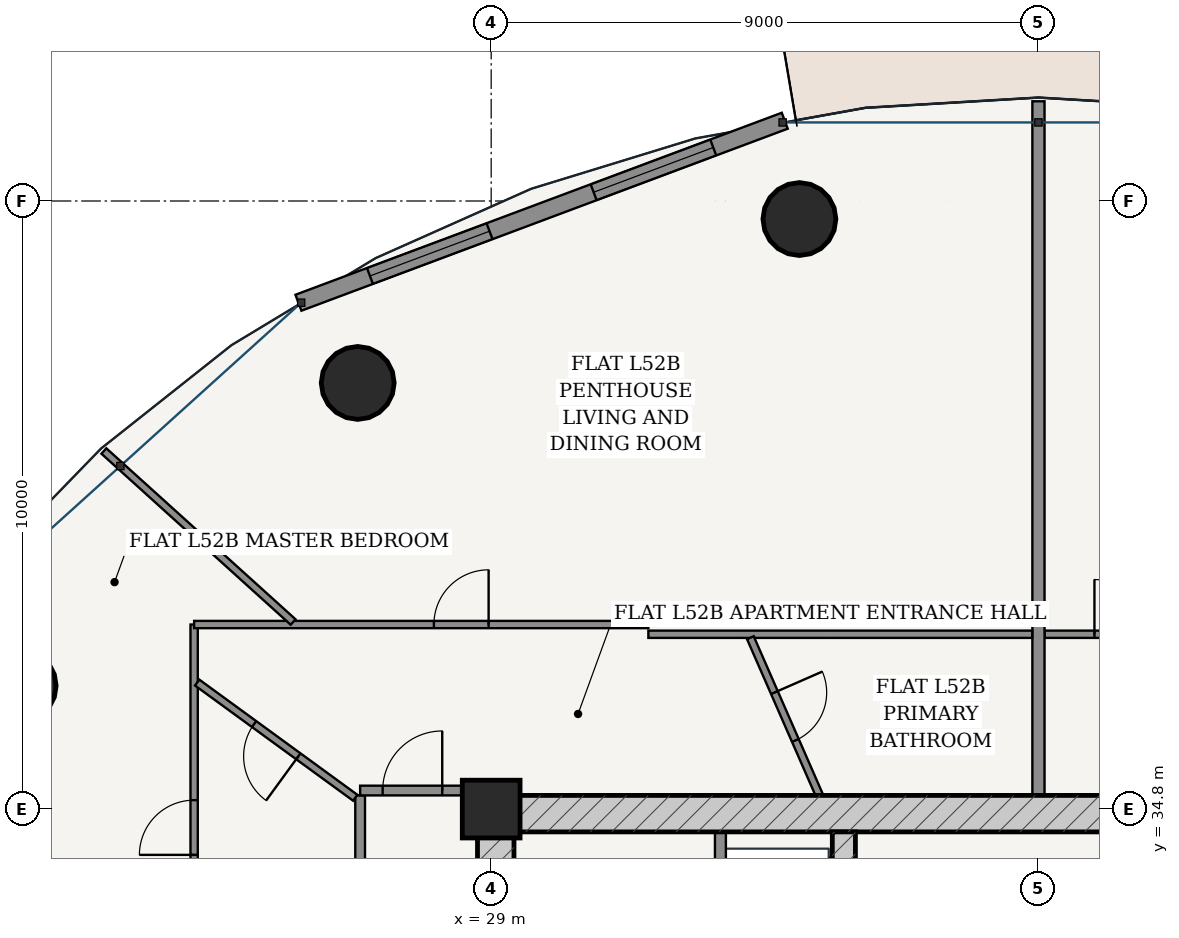
"""IFC4 building model, lengths in metres.
Left out: names, types, materials, properties, quantities, classifications, styles, units other than length and angle.
Written with IfcOpenShell. Run it as: python <this file> out.ifc"""

import sys

from ifc_helpers import new_model, si_unit, direction, frame, frame_2d, origin, origin_2d, place, context, subcontext, project, spatial, rectangle, hollow_circle, extrude, source, transform, mapped, element, fill, save


model = new_model("IFC4")
c1 = context("Model", 3, precision=1e-05, world=origin(), true_north=direction((-0.2419218956, 0.970295726276)))
c2 = subcontext(c1, "Body", "Model", "MODEL_VIEW")
j1 = project(units=[si_unit("LENGTHUNIT", "METRE"), si_unit("PLANEANGLEUNIT", "RADIAN")], contexts=[c1])
p1 = place(None, origin())
s1 = spatial("IfcSite", under=j1, at=p1, CompositionType="ELEMENT")
p2 = place(p1, origin())
s2 = spatial("IfcBuilding", under=s1, at=p2, CompositionType="ELEMENT")
p3 = place(p2, frame((0.0, 0.0, 198.6)))
s3 = spatial("IfcBuildingStorey", under=s2, at=p3, CompositionType="ELEMENT", Elevation=198.6)
p4 = place(p3, frame((29.0, 34.8, 0.0), z_axis=(0.0, 0.0, 1.0), x_axis=(1.0, 0.0, 0.0)))
e1 = element("IfcColumn", 1, at=p4, inside=s3, PredefinedType="COLUMN", context=c2, shape_type="SweptSolid", body=[
    extrude(rectangle(XDim=0.95, YDim=0.95, at=origin_2d()), origin(), (0.0, 0.0, 1.0), 3.7),
])
p5 = place(p3, frame((28.775, 34.725, 0.0), z_axis=(0.0, 0.0, 1.0), x_axis=(1.0, 0.0, 0.0)))
e2 = element("IfcWall", 2, at=p5, inside=s3, PredefinedType="SHEAR", context=c2, shape_type="SweptSolid", body=[
    extrude(rectangle(XDim=18.45, YDim=0.6, at=frame_2d((9.225, 0.0))), origin(), (0.0, 0.0, 1.0), 3.435),
])
p6 = place(p3, frame((29.075, 19.175, 0.0), z_axis=(0.0, 0.0, 1.0), x_axis=(0.0, 1.0, 0.0)))
e3 = element("IfcWall", 3, at=p6, inside=s3, PredefinedType="SHEAR", context=c2, shape_type="SweptSolid", body=[
    extrude(rectangle(XDim=15.25, YDim=0.6, at=frame_2d((7.625, 0.0))), origin(), (0.0, 0.0, 1.0), 3.435),
])
p7 = place(p6, frame((9.875, 0.0, 0.0)))
e4 = element("IfcOpeningElement", 4, at=p7, cuts=e3, PredefinedType="OPENING", context=c2, shape_type="SweptSolid", body=[
    extrude(rectangle(XDim=1.5, YDim=2.2, at=frame_2d((0.75, 1.1))), frame((0.0, 0.31, 0.0), z_axis=(0.0, -1.0, 0.0), x_axis=(1.0, 0.0, 0.0)), (0.0, 0.0, 1.0), 0.62),
])
p8 = place(p3, frame((34.8, 19.175, 0.0), z_axis=(0.0, 0.0, 1.0), x_axis=(0.0, 1.0, 0.0)))
e5 = element("IfcWall", 5, at=p8, inside=s3, PredefinedType="SHEAR", context=c2, shape_type="SweptSolid", body=[
    extrude(rectangle(XDim=15.25, YDim=0.38, at=frame_2d((7.625, 0.0))), origin(), (0.0, 0.0, 1.0), 3.435),
])
p9 = place(p8, frame((7.8, 0.0, 0.0)))
e6 = element("IfcOpeningElement", 6, at=p9, cuts=e5, PredefinedType="OPENING", context=c2, shape_type="SweptSolid", body=[
    extrude(rectangle(XDim=1.05, YDim=2.15, at=frame_2d((0.525, 1.075))), frame((0.0, 0.2, 0.0), z_axis=(0.0, -1.0, 0.0), x_axis=(1.0, 0.0, 0.0)), (0.0, 0.0, 1.0), 0.4),
])
for number, where, z_axis, x_axis in (
    (7, (34.069, 44.503, 0.0), (0.0, 0.0, 1.0), (1.0, 0.0, 0.0)),
    (8, (26.805, 41.808, 0.0), (0.0, 0.0, 1.0), (1.0, 0.0, 0.0)),
    (9, (21.246, 36.828, 0.0), (0.0, 0.0, 1.0), (1.0, 0.0, 0.0)),
):
    element("IfcColumn", number, at=place(p3, frame(where, z_axis=z_axis, x_axis=x_axis)), inside=s3, PredefinedType="COLUMN", context=c2, shape_type="SweptSolid", body=[
        extrude(hollow_circle(Radius=0.6, WallThickness=0.038, at=origin_2d()), origin(), (0.0, 0.0, 1.0), 3.7),
    ])
p10 = place(p3, frame((33.828, 46.12, 0.0), z_axis=(0.0, 0.0, 1.0), x_axis=(-0.936556918375, -0.350515532672, 0.0)))
e10 = element("IfcWall", 10, at=p10, inside=s3, PredefinedType="SOLIDWALL", context=c2, shape_type="SweptSolid", body=[
    extrude(rectangle(XDim=8.539, YDim=0.28, at=frame_2d((4.27, 0.0))), origin(), (0.0, 0.0, 1.0), 3.435),
])
p11 = place(p10, frame((1.256, 0.0, 0.85)))
e11 = element("IfcOpeningElement", 11, at=p11, cuts=e10, PredefinedType="OPENING", context=c2, shape_type="SweptSolid", body=[
    extrude(rectangle(XDim=2.1, YDim=1.95, at=frame_2d((1.05, 0.975))), frame((0.0, 0.15, 0.0), z_axis=(0.0, -1.0, 0.0), x_axis=(1.0, 0.0, 0.0)), (0.0, 0.0, 1.0), 0.3),
])
p12 = place(p10, frame((5.184, 0.0, 0.85)))
e12 = element("IfcOpeningElement", 12, at=p12, cuts=e10, PredefinedType="OPENING", context=c2, shape_type="SweptSolid", body=[
    extrude(rectangle(XDim=2.1, YDim=1.95, at=frame_2d((1.05, 0.975))), frame((0.0, 0.15, 0.0), z_axis=(0.0, -1.0, 0.0), x_axis=(1.0, 0.0, 0.0)), (0.0, 0.0, 1.0), 0.3),
])
p13 = place(p3, frame((32.77, 28.52, 0.0), z_axis=(0.0, 0.0, 1.0), x_axis=(0.0, 1.0, 0.0)))
e13 = element("IfcWall", 13, at=p13, inside=s3, PredefinedType="PARTITIONING", context=c2, shape_type="SweptSolid", body=[
    extrude(rectangle(XDim=5.905, YDim=0.18, at=frame_2d((2.953, 0.0))), origin(), (0.0, 0.0, 1.0), 3.435),
])
p14 = place(p13, frame((3.655, 0.0, 0.0)))
e14 = element("IfcOpeningElement", 14, at=p14, cuts=e13, PredefinedType="OPENING", context=c2, shape_type="SweptSolid", body=[
    extrude(rectangle(XDim=1.15, YDim=2.2, at=frame_2d((0.575, 1.1))), frame((0.0, 0.1, 0.0), z_axis=(0.0, -1.0, 0.0), x_axis=(1.0, 0.0, 0.0)), (0.0, 0.0, 1.0), 0.2),
])
p15 = place(p13, frame((0.73, 0.0, 0.0)))
e15 = element("IfcOpeningElement", 15, at=p15, cuts=e13, PredefinedType="OPENING", context=c2, shape_type="SweptSolid", body=[
    extrude(rectangle(XDim=1.2, YDim=2.25, at=frame_2d((0.6, 1.125))), frame((0.0, 0.1, 0.0), z_axis=(0.0, -1.0, 0.0), x_axis=(1.0, 0.0, 0.0)), (0.0, 0.0, 1.0), 0.2),
])
p16 = place(p3, frame((26.845, 24.4, 0.0), z_axis=(0.0, 0.0, 1.0), x_axis=(0.0, 1.0, 0.0)))
e16 = element("IfcWall", 16, at=p16, inside=s3, PredefinedType="PARTITIONING", context=c2, shape_type="SweptSolid", body=[
    extrude(rectangle(XDim=10.625, YDim=0.16, at=frame_2d((5.312, 0.0))), origin(), (0.0, 0.0, 1.0), 2.951),
])
p17 = place(p3, frame((26.845, 35.105, 0.0), z_axis=(0.0, 0.0, 1.0), x_axis=(1.0, 0.0, 0.0)))
e17 = element("IfcWall", 17, at=p17, inside=s3, PredefinedType="PARTITIONING", context=c2, shape_type="SweptSolid", body=[
    extrude(rectangle(XDim=1.93, YDim=0.16, at=frame_2d((0.965, 0.0))), origin(), (0.0, 0.0, 1.0), 3.435),
])
p18 = place(p17, frame((0.37, 0.0, 0.0)))
e18 = element("IfcOpeningElement", 18, at=p18, cuts=e17, PredefinedType="OPENING", context=c2, shape_type="SweptSolid", body=[
    extrude(rectangle(XDim=0.98, YDim=2.2, at=frame_2d((0.49, 1.1))), frame((0.0, 0.09, 0.0), z_axis=(0.0, -1.0, 0.0), x_axis=(1.0, 0.0, 0.0)), (0.0, 0.0, 1.0), 0.18),
])
p19 = place(p3, frame((38.102, 37.675, 0.0), z_axis=(0.0, 0.0, 1.0), x_axis=(1.0, 0.0, 0.0)))
e19 = element("IfcWall", 19, at=p19, inside=s3, PredefinedType="PARTITIONING", context=c2, shape_type="SweptSolid", body=[
    extrude(rectangle(XDim=6.313, YDim=0.12, at=frame_2d((3.156, 0.0))), origin(), (0.0, 0.0, 1.0), 2.951),
])
p20 = place(p19, frame((0.819, 0.0, 0.0)))
e20 = element("IfcOpeningElement", 20, at=p20, cuts=e19, PredefinedType="OPENING", context=c2, shape_type="SweptSolid", body=[
    extrude(rectangle(XDim=0.9, YDim=2.15, at=frame_2d((0.45, 1.075))), frame((0.0, 0.07, 0.0), z_axis=(0.0, -1.0, 0.0), x_axis=(1.0, 0.0, 0.0)), (0.0, 0.0, 1.0), 0.14),
])
p21 = place(p3, frame((38.0, 35.027, 0.0), z_axis=(0.0, 0.0, 1.0), x_axis=(0.0, 1.0, 0.0)))
e21 = element("IfcWall", 21, at=p21, inside=s3, PredefinedType="PARTITIONING", context=c2, shape_type="SweptSolid", body=[
    extrude(rectangle(XDim=11.413, YDim=0.2, at=frame_2d((5.707, 0.0))), origin(), (0.0, 0.0, 1.0), 2.52),
])
p22 = place(p3, frame((24.115, 24.406, 0.0), z_axis=(0.0, 0.0, 1.0), x_axis=(0.0, 1.0, 0.0)))
e22 = element("IfcWall", 22, at=p22, inside=s3, PredefinedType="PARTITIONING", context=c2, shape_type="SweptSolid", body=[
    extrude(rectangle(XDim=13.429, YDim=0.12, at=frame_2d((6.714, 0.0))), origin(), (0.0, 0.0, 1.0), 2.951),
])
p23 = place(p22, frame((9.641, 0.0, 0.0)))
e23 = element("IfcOpeningElement", 23, at=p23, cuts=e22, PredefinedType="OPENING", context=c2, shape_type="SweptSolid", body=[
    extrude(rectangle(XDim=0.9, YDim=2.15, at=frame_2d((0.45, 1.075))), frame((0.0, 0.07, 0.0), z_axis=(0.0, -1.0, 0.0), x_axis=(1.0, 0.0, 0.0)), (0.0, 0.0, 1.0), 0.14),
])
p24 = place(p3, frame((24.115, 37.835, 0.0), z_axis=(0.0, 0.0, 1.0), x_axis=(1.0, 0.0, 0.0)))
e24 = element("IfcWall", 24, at=p24, inside=s3, PredefinedType="PARTITIONING", context=c2, shape_type="SweptSolid", body=[
    extrude(rectangle(XDim=7.47, YDim=0.12, at=frame_2d((3.735, 0.0))), origin(), (0.0, 0.0, 1.0), 2.951),
])
p25 = place(p24, frame((3.943, 0.0, 0.0)))
e25 = element("IfcOpeningElement", 25, at=p25, cuts=e24, PredefinedType="OPENING", context=c2, shape_type="SweptSolid", body=[
    extrude(rectangle(XDim=0.9, YDim=2.15, at=frame_2d((0.45, 1.075))), frame((0.0, 0.07, 0.0), z_axis=(0.0, -1.0, 0.0), x_axis=(1.0, 0.0, 0.0)), (0.0, 0.0, 1.0), 0.14),
])
p26 = place(p3, frame((31.585, 37.675, 0.0), z_axis=(0.0, 0.0, 1.0), x_axis=(1.0, 0.0, 0.0)))
e26 = element("IfcWall", 26, at=p26, inside=s3, PredefinedType="PARTITIONING", context=c2, shape_type="SweptSolid", body=[
    extrude(rectangle(XDim=6.313, YDim=0.12, at=frame_2d((3.156, 0.0))), origin(), (0.0, 0.0, 1.0), 2.951),
])
p27 = place(p3, frame((25.743, 37.876, 0.0), z_axis=(0.0, 0.0, 1.0), x_axis=(-0.741943837234, 0.670462036502, 0.0)))
e27 = element("IfcWall", 27, at=p27, inside=s3, PredefinedType="PARTITIONING", context=c2, shape_type="SweptSolid", body=[
    extrude(rectangle(XDim=4.194, YDim=0.12, at=frame_2d((2.097, 0.0))), origin(), (0.0, 0.0, 1.0), 2.951),
])
p28 = place(p3, frame((24.057, 32.019, 0.0), z_axis=(0.0, 0.0, 1.0), x_axis=(-0.936540194592, 0.350560214389, 0.0)))
e28 = element("IfcWall", 28, at=p28, inside=s3, PredefinedType="PARTITIONING", context=c2, shape_type="SweptSolid", body=[
    extrude(rectangle(XDim=6.556, YDim=0.12, at=frame_2d((3.278, 0.0))), origin(), (0.0, 0.0, 1.0), 2.951),
])
p29 = place(p28, frame((2.828, 0.0, 0.0)))
e29 = element("IfcOpeningElement", 29, at=p29, cuts=e28, PredefinedType="OPENING", context=c2, shape_type="SweptSolid", body=[
    extrude(rectangle(XDim=0.9, YDim=2.15, at=frame_2d((0.45, 1.075))), frame((0.0, 0.07, 0.0), z_axis=(0.0, -1.0, 0.0), x_axis=(1.0, 0.0, 0.0)), (0.0, 0.0, 1.0), 0.14),
])
p30 = place(p3, frame((34.397, 35.027, 0.0), z_axis=(0.0, 0.0, 1.0), x_axis=(-0.401135725485, 0.916018629581, 0.0)))
e30 = element("IfcWall", 30, at=p30, inside=s3, PredefinedType="PARTITIONING", context=c2, shape_type="SweptSolid", body=[
    extrude(rectangle(XDim=2.829, YDim=0.12, at=frame_2d((1.415, 0.0))), origin(), (0.0, 0.0, 1.0), 3.435),
])
p31 = place(p30, frame((0.985, 0.0, 0.0)))
e31 = element("IfcOpeningElement", 31, at=p31, cuts=e30, PredefinedType="OPENING", context=c2, shape_type="SweptSolid", body=[
    extrude(rectangle(XDim=0.86, YDim=2.15, at=frame_2d((0.43, 1.075))), frame((0.0, 0.07, 0.0), z_axis=(0.0, -1.0, 0.0), x_axis=(1.0, 0.0, 0.0)), (0.0, 0.0, 1.0), 0.14),
])
p32 = place(p3, frame((26.765, 34.986, 0.0), z_axis=(0.0, 0.0, 1.0), x_axis=(-0.808220499107, 0.588879974887, 0.0)))
e32 = element("IfcWall", 32, at=p32, inside=s3, PredefinedType="PARTITIONING", context=c2, shape_type="SweptSolid", body=[
    extrude(rectangle(XDim=3.217, YDim=0.12, at=frame_2d((1.608, 0.0))), origin(), (0.0, 0.0, 1.0), 3.11),
])
p33 = place(p32, frame((1.158, 0.0, 0.0)))
e33 = element("IfcOpeningElement", 33, at=p33, cuts=e32, PredefinedType="OPENING", context=c2, shape_type="SweptSolid", body=[
    extrude(rectangle(XDim=0.9, YDim=2.15, at=frame_2d((0.45, 1.075))), frame((0.0, 0.07, 0.0), z_axis=(0.0, -1.0, 0.0), x_axis=(1.0, 0.0, 0.0)), (0.0, 0.0, 1.0), 0.14),
])
m1 = source(origin(), c2, "Body", "SweptSolid", [
    extrude(rectangle(XDim=2.1, YDim=1.95, at=frame_2d((1.05, 0.975))), frame((0.0, 0.03, 0.0), z_axis=(0.0, -1.0, 0.0), x_axis=(1.0, 0.0, 0.0)), (0.0, 0.0, 1.0), 0.06),
])
p34 = place(p11, origin())
e34 = element("IfcWindow", 34, at=p34, inside=s3, PartitioningType="SINGLE_PANEL", PredefinedType="WINDOW", context=c2, shape_type="MappedRepresentation", body=[
    mapped(m1, transform((0.0, 0.0, 0.0), scale=1.0)),
])
fill(e11, e34)
p35 = place(p12, origin())
e35 = element("IfcWindow", 35, at=p35, inside=s3, PartitioningType="SINGLE_PANEL", PredefinedType="WINDOW", context=c2, shape_type="MappedRepresentation", body=[
    mapped(m1, transform((0.0, 0.0, 0.0), scale=1.0)),
])
fill(e12, e35)
m2 = source(origin(), c2, "Body", "SweptSolid", [
    extrude(rectangle(XDim=0.9, YDim=2.15, at=frame_2d((0.45, 1.075))), frame((0.0, 0.025, 0.0), z_axis=(0.0, -1.0, 0.0), x_axis=(1.0, 0.0, 0.0)), (0.0, 0.0, 1.0), 0.05),
])
p36 = place(p20, origin())
e36 = element("IfcDoor", 36, at=p36, inside=s3, OperationType="SINGLE_SWING_LEFT", PredefinedType="DOOR", context=c2, shape_type="MappedRepresentation", body=[
    mapped(m2, transform((0.0, 0.0, 0.0), scale=1.0)),
])
fill(e20, e36)
m3 = source(origin(), c2, "Body", "SweptSolid", [
    extrude(rectangle(XDim=0.98, YDim=2.2, at=frame_2d((0.49, 1.1))), frame((0.0, 0.025, 0.0), z_axis=(0.0, -1.0, 0.0), x_axis=(1.0, 0.0, 0.0)), (0.0, 0.0, 1.0), 0.05),
])
p37 = place(p18, origin())
e37 = element("IfcDoor", 37, at=p37, inside=s3, OperationType="SINGLE_SWING_RIGHT", PredefinedType="DOOR", context=c2, shape_type="MappedRepresentation", body=[
    mapped(m3, transform((0.0, 0.0, 0.0), scale=1.0)),
])
fill(e18, e37)
m4 = source(origin(), c2, "Body", "SweptSolid", [
    extrude(rectangle(XDim=0.86, YDim=2.15, at=frame_2d((0.43, 1.075))), frame((0.0, 0.025, 0.0), z_axis=(0.0, -1.0, 0.0), x_axis=(1.0, 0.0, 0.0)), (0.0, 0.0, 1.0), 0.05),
])
p38 = place(p31, frame((0.86, 0.0, 0.0), z_axis=(0.0, 0.0, 1.0), x_axis=(-1.0, 0.0, 0.0)))
e38 = element("IfcDoor", 38, at=p38, inside=s3, OperationType="SINGLE_SWING_LEFT", PredefinedType="DOOR", context=c2, shape_type="MappedRepresentation", body=[
    mapped(m4, transform((0.0, 0.0, 0.0), scale=1.0)),
])
fill(e31, e38)
p39 = place(p25, origin())
e39 = element("IfcDoor", 39, at=p39, inside=s3, OperationType="SINGLE_SWING_RIGHT", PredefinedType="DOOR", context=c2, shape_type="MappedRepresentation", body=[
    mapped(m2, transform((0.0, 0.0, 0.0), scale=1.0)),
])
fill(e25, e39)
p40 = place(p33, origin())
e40 = element("IfcDoor", 40, at=p40, inside=s3, OperationType="SINGLE_SWING_LEFT", PredefinedType="DOOR", context=c2, shape_type="MappedRepresentation", body=[
    mapped(m2, transform((0.0, 0.0, 0.0), scale=1.0)),
])
fill(e33, e40)
p41 = place(p23, origin())
e41 = element("IfcDoor", 41, at=p41, inside=s3, OperationType="SINGLE_SWING_LEFT", PredefinedType="DOOR", context=c2, shape_type="MappedRepresentation", body=[
    mapped(m2, transform((0.0, 0.0, 0.0), scale=1.0)),
])
fill(e23, e41)
save(model, sys.argv[1])
